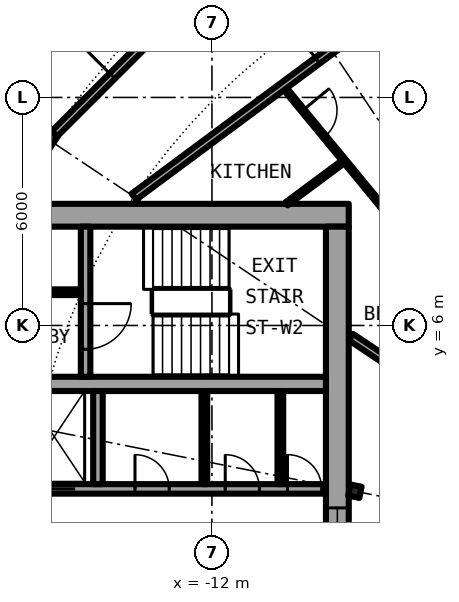
"""IFC4 building model, lengths in metres.
Left out: names, types, materials, properties, quantities, classifications, styles, units other than length and angle.
Written with IfcOpenShell. Run it as: python <this file> out.ifc"""

import sys

from ifc_helpers import new_model, si_unit, direction, frame, frame_2d, origin, origin_2d, place, context, subcontext, project, spatial, rectangle, i_section, extrude, element, fill, save


model = new_model("IFC4")
c1 = context("Model", 3, precision=1e-05, world=origin(), true_north=direction((0.0, 1.0)))
c2 = subcontext(c1, "Body", "Model", "MODEL_VIEW")
j1 = project(units=[si_unit("LENGTHUNIT", "METRE"), si_unit("PLANEANGLEUNIT", "RADIAN")], contexts=[c1])
p1 = place(None, origin())
s1 = spatial("IfcSite", under=j1, at=p1, CompositionType="ELEMENT")
p2 = place(p1, origin())
s2 = spatial("IfcBuilding", under=s1, at=p2, CompositionType="ELEMENT")
p3 = place(p2, frame((0.0, 0.0, 117.75)))
s3 = spatial("IfcBuildingStorey", under=s2, at=p3, CompositionType="ELEMENT", Elevation=117.75)
p4 = place(p3, frame((-16.297, 10.889, 0.0), z_axis=(0.0, 0.0, 1.0), x_axis=(-0.831469612303, 0.55557023302, 0.0)))
e1 = element("IfcColumn", 1, at=p4, inside=s3, PredefinedType="COLUMN", context=c2, shape_type="SweptSolid", body=[
    extrude(i_section(OverallWidth=0.307, OverallDepth=0.432, WebThickness=0.021, FlangeThickness=0.04, FilletRadius=0.027, at=origin_2d()), origin(), (0.0, 0.0, 1.0), 3.05),
])
p5 = place(p3, frame((-8.239, 1.639, 0.0), z_axis=(0.0, 0.0, 1.0), x_axis=(-0.980785280403, 0.195090322016, 0.0)))
e2 = element("IfcColumn", 2, at=p5, inside=s3, PredefinedType="COLUMN", context=c2, shape_type="SweptSolid", body=[
    extrude(i_section(OverallWidth=0.3, OverallDepth=0.3, WebThickness=0.011, FlangeThickness=0.019, FilletRadius=0.027, at=origin_2d()), origin(), (0.0, 0.0, 1.0), 3.05),
])
p6 = place(p3, frame((-8.4, 8.9, 0.0), z_axis=(0.0, 0.0, 1.0), x_axis=(-1.0, 0.0, 0.0)))
e3 = element("IfcWall", 3, at=p6, inside=s3, PredefinedType="SHEAR", context=c2, shape_type="SweptSolid", body=[
    extrude(rectangle(XDim=13.8, YDim=0.6, at=frame_2d((6.9, 0.0))), origin(), (0.0, 0.0, 1.0), 3.05),
])
p7 = place(p6, frame((11.475, 0.0, 0.0)))
e4 = element("IfcOpeningElement", 4, at=p7, cuts=e3, PredefinedType="OPENING", context=c2, shape_type="SweptSolid", body=[
    extrude(rectangle(XDim=1.2, YDim=2.3, at=frame_2d((0.6, 1.15))), frame((0.0, 0.31, 0.0), z_axis=(0.0, -1.0, 0.0), x_axis=(1.0, 0.0, 0.0)), (0.0, 0.0, 1.0), 0.62),
])
p8 = place(p3, frame((-8.7, 8.6, 0.0), z_axis=(0.0, 0.0, 1.0), x_axis=(0.0, -1.0, 0.0)))
e5 = element("IfcWall", 5, at=p8, inside=s3, PredefinedType="SHEAR", context=c2, shape_type="SweptSolid", body=[
    extrude(rectangle(XDim=17.2, YDim=0.6, at=frame_2d((8.6, 0.0))), origin(), (0.0, 0.0, 1.0), 3.05),
])
p9 = place(p8, frame((7.4, 0.0, 0.1)))
e6 = element("IfcOpeningElement", 6, at=p9, cuts=e5, PredefinedType="OPENING", context=c2, shape_type="SweptSolid", body=[
    extrude(rectangle(XDim=2.4, YDim=2.2, at=frame_2d((1.2, 1.1))), frame((0.0, 0.31, 0.0), z_axis=(0.0, -1.0, 0.0), x_axis=(1.0, 0.0, 0.0)), (0.0, 0.0, 1.0), 0.62),
])
p10 = place(p3, frame((-19.15, 1.7, 0.0), z_axis=(0.0, 0.0, 1.0), x_axis=(1.0, 0.0, 0.0)))
e7 = element("IfcWall", 7, at=p10, inside=s3, PredefinedType="SHEAR", context=c2, shape_type="SweptSolid", body=[
    extrude(rectangle(XDim=10.15, YDim=0.25, at=frame_2d((5.075, 0.0))), origin(), (0.0, 0.0, 1.0), 3.05),
])
p11 = place(p10, frame((2.45, 0.0, 0.0)))
e8 = element("IfcOpeningElement", 8, at=p11, cuts=e7, PredefinedType="OPENING", context=c2, shape_type="SweptSolid", body=[
    extrude(rectangle(XDim=1.1, YDim=2.3, at=frame_2d((0.55, 1.15))), frame((0.0, 0.135, 0.0), z_axis=(0.0, -1.0, 0.0), x_axis=(1.0, 0.0, 0.0)), (0.0, 0.0, 1.0), 0.27),
])
p12 = place(p10, frame((9.137, 0.0, 0.0)))
e9 = element("IfcOpeningElement", 9, at=p12, cuts=e7, PredefinedType="OPENING", context=c2, shape_type="SweptSolid", body=[
    extrude(rectangle(XDim=0.9, YDim=2.3, at=frame_2d((0.45, 1.15))), frame((0.0, 0.135, 0.0), z_axis=(0.0, -1.0, 0.0), x_axis=(1.0, 0.0, 0.0)), (0.0, 0.0, 1.0), 0.27),
])
p13 = place(p10, frame((7.5, 0.0, 0.0)))
e10 = element("IfcOpeningElement", 10, at=p13, cuts=e7, PredefinedType="OPENING", context=c2, shape_type="SweptSolid", body=[
    extrude(rectangle(XDim=0.9, YDim=2.3, at=frame_2d((0.45, 1.15))), frame((0.0, 0.135, 0.0), z_axis=(0.0, -1.0, 0.0), x_axis=(1.0, 0.0, 0.0)), (0.0, 0.0, 1.0), 0.27),
])
p14 = place(p10, frame((5.125, 0.0, 0.0)))
e11 = element("IfcOpeningElement", 11, at=p14, cuts=e7, PredefinedType="OPENING", context=c2, shape_type="SweptSolid", body=[
    extrude(rectangle(XDim=0.9, YDim=2.3, at=frame_2d((0.45, 1.15))), frame((0.0, 0.135, 0.0), z_axis=(0.0, -1.0, 0.0), x_axis=(1.0, 0.0, 0.0)), (0.0, 0.0, 1.0), 0.27),
])
p15 = place(p3, frame((-9.0, 4.462, 0.0), z_axis=(0.0, 0.0, 1.0), x_axis=(-1.0, 0.0, 0.0)))
e12 = element("IfcWall", 12, at=p15, inside=s3, PredefinedType="SHEAR", context=c2, shape_type="SweptSolid", body=[
    extrude(rectangle(XDim=10.15, YDim=0.375, at=frame_2d((5.075, 0.0))), origin(), (0.0, 0.0, 1.0), 3.05),
])
p16 = place(p3, frame((-15.325, 8.6, 0.0), z_axis=(0.0, 0.0, 1.0), x_axis=(0.0, -1.0, 0.0)))
e13 = element("IfcWall", 13, at=p16, inside=s3, PredefinedType="SHEAR", context=c2, shape_type="SweptSolid", body=[
    extrude(rectangle(XDim=3.95, YDim=0.25, at=frame_2d((1.975, 0.0))), origin(), (0.0, 0.0, 1.0), 3.05),
])
p17 = place(p16, frame((2.025, 0.0, 0.0)))
e14 = element("IfcOpeningElement", 14, at=p17, cuts=e13, PredefinedType="OPENING", context=c2, shape_type="SweptSolid", body=[
    extrude(rectangle(XDim=1.2, YDim=2.3, at=frame_2d((0.6, 1.15))), frame((0.0, 0.135, 0.0), z_axis=(0.0, -1.0, 0.0), x_axis=(1.0, 0.0, 0.0)), (0.0, 0.0, 1.0), 0.27),
])
p18 = place(p3, frame((-15.0, 1.825, 0.0), z_axis=(0.0, 0.0, 1.0), x_axis=(0.0, 1.0, 0.0)))
e15 = element("IfcWall", 15, at=p18, inside=s3, PredefinedType="SOLIDWALL", context=c2, shape_type="SweptSolid", body=[
    extrude(rectangle(XDim=2.45, YDim=0.25, at=frame_2d((1.225, 0.0))), origin(), (0.0, 0.0, 1.0), 2.7),
])
for number, where, z_axis, x_axis in (
    (16, (-10.2, 1.825, 0.0), (0.0, 0.0, 1.0), (0.0, 1.0, 0.0)),
    (17, (-12.2, 1.825, 0.0), (0.0, 0.0, 1.0), (0.0, 1.0, 0.0)),
):
    element("IfcWall", number, at=place(p3, frame(where, z_axis=z_axis, x_axis=x_axis)), inside=s3, PredefinedType="PARTITIONING", context=c2, shape_type="SweptSolid", body=[
        extrude(rectangle(XDim=2.45, YDim=0.15, at=frame_2d((1.225, 0.0))), origin(), (0.0, 0.0, 1.0), 2.7),
    ])
p19 = place(p3, frame((-15.45, 6.875, 0.0), z_axis=(0.0, 0.0, 1.0), x_axis=(-1.0, 0.0, 0.0)))
e18 = element("IfcWall", 18, at=p19, inside=s3, PredefinedType="PARTITIONING", context=c2, shape_type="SweptSolid", body=[
    extrude(rectangle(XDim=3.7, YDim=0.15, at=frame_2d((1.85, 0.0))), origin(), (0.0, 0.0, 1.0), 2.7),
])
p20 = place(p19, frame((1.4, 0.0, 0.0)))
e19 = element("IfcOpeningElement", 19, at=p20, cuts=e18, PredefinedType="OPENING", context=c2, shape_type="SweptSolid", body=[
    extrude(rectangle(XDim=0.9, YDim=2.3, at=frame_2d((0.45, 1.15))), frame((0.0, 0.085, 0.0), z_axis=(0.0, -1.0, 0.0), x_axis=(1.0, 0.0, 0.0)), (0.0, 0.0, 1.0), 0.17),
])
p21 = place(p3, frame((-10.132, 12.296, 0.0), z_axis=(0.0, 0.0, 1.0), x_axis=(0.635976043025, -0.771708800454, 0.0)))
e20 = element("IfcWall", 20, at=p21, inside=s3, PredefinedType="PARTITIONING", context=c2, shape_type="SweptSolid", body=[
    extrude(rectangle(XDim=8.213, YDim=0.1, at=frame_2d((4.106, 0.0))), origin(), (0.0, 0.0, 1.0), 2.7),
])
p22 = place(p21, frame((0.823, 0.0, 0.0)))
e21 = element("IfcOpeningElement", 21, at=p22, cuts=e20, PredefinedType="OPENING", context=c2, shape_type="SweptSolid", body=[
    extrude(rectangle(XDim=0.9, YDim=2.3, at=frame_2d((0.45, 1.15))), frame((0.0, 0.06, 0.0), z_axis=(0.0, -1.0, 0.0), x_axis=(1.0, 0.0, 0.0)), (0.0, 0.0, 1.0), 0.12),
])
p23 = place(p21, frame((4.929, 0.0, 0.0)))
e22 = element("IfcOpeningElement", 22, at=p23, cuts=e20, PredefinedType="OPENING", context=c2, shape_type="SweptSolid", body=[
    extrude(rectangle(XDim=0.9, YDim=2.3, at=frame_2d((0.45, 1.15))), frame((0.0, 0.06, 0.0), z_axis=(0.0, -1.0, 0.0), x_axis=(1.0, 0.0, 0.0)), (0.0, 0.0, 1.0), 0.12),
])
p24 = place(p3, frame((-6.513, 4.472, 0.0), z_axis=(0.0, 0.0, 1.0), x_axis=(-0.831333375071, 0.555774072347, 0.0)))
e23 = element("IfcWall", 23, at=p24, inside=s3, PredefinedType="PARTITIONING", context=c2, shape_type="SweptSolid", body=[
    extrude(rectangle(XDim=2.203, YDim=0.2, at=frame_2d((1.101, 0.0))), origin(), (0.0, 0.0, 1.0), 2.7),
])
p25 = place(p3, frame((-10.039, 9.2, 0.0), z_axis=(0.0, 0.0, 1.0), x_axis=(0.803149591038, 0.595777420196, 0.0)))
e24 = element("IfcWall", 24, at=p25, inside=s3, PredefinedType="PARTITIONING", context=c2, shape_type="SweptSolid", body=[
    extrude(rectangle(XDim=1.9, YDim=0.1, at=frame_2d((0.95, 0.0))), origin(), (0.0, 0.0, 1.0), 2.7),
])
p26 = place(p3, frame((-14.052, 9.389, 0.0), z_axis=(0.0, 0.0, 1.0), x_axis=(0.803204584823, 0.59570327758, 0.0)))
e25 = element("IfcWall", 25, at=p26, inside=s3, PredefinedType="PARTITIONING", context=c2, shape_type="SweptSolid", body=[
    extrude(rectangle(XDim=11.387, YDim=0.2, at=frame_2d((5.693, 0.0))), origin(), (0.0, 0.0, 1.0), 2.7),
])
p27 = place(p26, frame((6.007, 0.0, 0.0)))
e26 = element("IfcOpeningElement", 26, at=p27, cuts=e25, PredefinedType="OPENING", context=c2, shape_type="SweptSolid", body=[
    extrude(rectangle(XDim=1.0, YDim=2.3, at=frame_2d((0.5, 1.15))), frame((0.0, 0.11, 0.0), z_axis=(0.0, -1.0, 0.0), x_axis=(1.0, 0.0, 0.0)), (0.0, 0.0, 1.0), 0.22),
])
p28 = place(p3, frame((-16.186, 11.0, 0.0), z_axis=(0.0, 0.0, 1.0), x_axis=(0.707106781187, 0.707106781187, 0.0)))
e27 = element("IfcWall", 27, at=p28, inside=s3, PredefinedType="PARTITIONING", context=c2, shape_type="SweptSolid", body=[
    extrude(rectangle(XDim=7.334, YDim=0.2, at=frame_2d((3.667, 0.0))), origin(), (0.0, 0.0, 1.0), 2.39),
])
p29 = place(p28, frame((2.211, 0.0, 0.0)))
e28 = element("IfcOpeningElement", 28, at=p29, cuts=e27, PredefinedType="OPENING", context=c2, shape_type="SweptSolid", body=[
    extrude(rectangle(XDim=1.0, YDim=2.3, at=frame_2d((0.5, 1.15))), frame((0.0, 0.11, 0.0), z_axis=(0.0, -1.0, 0.0), x_axis=(1.0, 0.0, 0.0)), (0.0, 0.0, 1.0), 0.22),
])
p30 = place(p3, frame((-18.542, 12.389, 0.0), z_axis=(0.0, 0.0, 1.0), x_axis=(0.707190945535, 0.707022606819, 0.0)))
e29 = element("IfcWall", 29, at=p30, inside=s3, PredefinedType="PARTITIONING", context=c2, shape_type="SweptSolid", body=[
    extrude(rectangle(XDim=4.351, YDim=0.1, at=frame_2d((2.175, 0.0))), origin(), (0.0, 0.0, 1.0), 2.7),
])
p31 = place(p30, frame((0.639, 0.0, 0.0)))
e30 = element("IfcOpeningElement", 30, at=p31, cuts=e29, PredefinedType="OPENING", context=c2, shape_type="SweptSolid", body=[
    extrude(rectangle(XDim=0.9, YDim=2.3, at=frame_2d((0.45, 1.15))), frame((0.0, 0.06, 0.0), z_axis=(0.0, -1.0, 0.0), x_axis=(1.0, 0.0, 0.0)), (0.0, 0.0, 1.0), 0.12),
])
p32 = place(p11, origin())
e31 = element("IfcDoor", 31, at=p32, inside=s3, OperationType="DOUBLE_DOOR_SLIDING", PredefinedType="DOOR", context=c2, shape_type="SweptSolid", body=[
    extrude(rectangle(XDim=1.1, YDim=2.3, at=frame_2d((0.55, 1.15))), frame((0.0, 0.025, 0.0), z_axis=(0.0, -1.0, 0.0), x_axis=(1.0, 0.0, 0.0)), (0.0, 0.0, 1.0), 0.05),
])
fill(e8, e31)
p33 = place(p12, origin())
e32 = element("IfcDoor", 32, at=p33, inside=s3, OperationType="SINGLE_SWING_LEFT", PredefinedType="DOOR", context=c2, shape_type="SweptSolid", body=[
    extrude(rectangle(XDim=0.9, YDim=2.3, at=frame_2d((0.45, 1.15))), frame((0.0, 0.025, 0.0), z_axis=(0.0, -1.0, 0.0), x_axis=(1.0, 0.0, 0.0)), (0.0, 0.0, 1.0), 0.05),
])
fill(e9, e32)
p34 = place(p13, origin())
e33 = element("IfcDoor", 33, at=p34, inside=s3, OperationType="SINGLE_SWING_LEFT", PredefinedType="DOOR", context=c2, shape_type="SweptSolid", body=[
    extrude(rectangle(XDim=0.9, YDim=2.3, at=frame_2d((0.45, 1.15))), frame((0.0, 0.025, 0.0), z_axis=(0.0, -1.0, 0.0), x_axis=(1.0, 0.0, 0.0)), (0.0, 0.0, 1.0), 0.05),
])
fill(e10, e33)
p35 = place(p14, origin())
e34 = element("IfcDoor", 34, at=p35, inside=s3, OperationType="SINGLE_SWING_LEFT", PredefinedType="DOOR", context=c2, shape_type="SweptSolid", body=[
    extrude(rectangle(XDim=0.9, YDim=2.3, at=frame_2d((0.45, 1.15))), frame((0.0, 0.025, 0.0), z_axis=(0.0, -1.0, 0.0), x_axis=(1.0, 0.0, 0.0)), (0.0, 0.0, 1.0), 0.05),
])
fill(e11, e34)
p36 = place(p17, origin())
e35 = element("IfcDoor", 35, at=p36, inside=s3, OperationType="SINGLE_SWING_LEFT", PredefinedType="DOOR", context=c2, shape_type="SweptSolid", body=[
    extrude(rectangle(XDim=1.2, YDim=2.3, at=frame_2d((0.6, 1.15))), frame((0.0, 0.025, 0.0), z_axis=(0.0, -1.0, 0.0), x_axis=(1.0, 0.0, 0.0)), (0.0, 0.0, 1.0), 0.05),
])
fill(e14, e35)
p37 = place(p9, origin())
e36 = element("IfcWindow", 36, at=p37, inside=s3, PartitioningType="SINGLE_PANEL", PredefinedType="WINDOW", context=c2, shape_type="SweptSolid", body=[
    extrude(rectangle(XDim=2.4, YDim=2.2, at=frame_2d((1.2, 1.1))), frame((0.0, 0.03, 0.0), z_axis=(0.0, -1.0, 0.0), x_axis=(1.0, 0.0, 0.0)), (0.0, 0.0, 1.0), 0.06),
])
fill(e6, e36)
p38 = place(p29, origin())
e37 = element("IfcDoor", 37, at=p38, inside=s3, OperationType="SINGLE_SWING_LEFT", PredefinedType="DOOR", context=c2, shape_type="SweptSolid", body=[
    extrude(rectangle(XDim=1.0, YDim=2.3, at=frame_2d((0.5, 1.15))), frame((0.0, 0.025, 0.0), z_axis=(0.0, -1.0, 0.0), x_axis=(1.0, 0.0, 0.0)), (0.0, 0.0, 1.0), 0.05),
])
fill(e28, e37)
p39 = place(p27, origin())
e38 = element("IfcDoor", 38, at=p39, inside=s3, OperationType="SINGLE_SWING_RIGHT", PredefinedType="DOOR", context=c2, shape_type="SweptSolid", body=[
    extrude(rectangle(XDim=1.0, YDim=2.3, at=frame_2d((0.5, 1.15))), frame((0.0, 0.025, 0.0), z_axis=(0.0, -1.0, 0.0), x_axis=(1.0, 0.0, 0.0)), (0.0, 0.0, 1.0), 0.05),
])
fill(e26, e38)
p40 = place(p22, origin())
e39 = element("IfcDoor", 39, at=p40, inside=s3, OperationType="SINGLE_SWING_LEFT", PredefinedType="DOOR", context=c2, shape_type="SweptSolid", body=[
    extrude(rectangle(XDim=0.9, YDim=2.3, at=frame_2d((0.45, 1.15))), frame((0.0, 0.025, 0.0), z_axis=(0.0, -1.0, 0.0), x_axis=(1.0, 0.0, 0.0)), (0.0, 0.0, 1.0), 0.05),
])
fill(e21, e39)
save(model, sys.argv[1])
